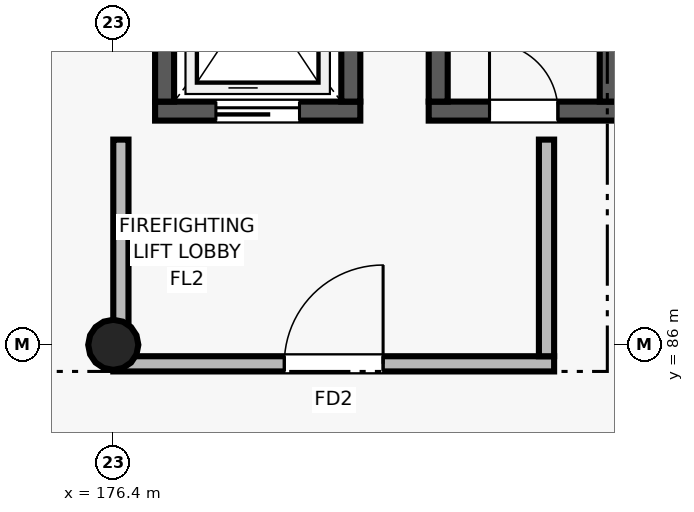
"""IFC4 building model, lengths in metres.
Left out: names, types, materials, properties, quantities, classifications, styles, units other than length and angle.
Written with IfcOpenShell. Run it as: python <this file> out.ifc"""

import sys

from ifc_helpers import new_model, si_unit, direction, frame, frame_2d, origin, origin_2d, place, context, subcontext, project, spatial, rectangle, circle, extrude, element, fill, save


model = new_model("IFC4")
c1 = context("Model", 3, precision=1e-05, world=origin(), true_north=direction((0.0, 1.0)))
c2 = subcontext(c1, "Body", "Model", "MODEL_VIEW")
j1 = project(units=[si_unit("LENGTHUNIT", "METRE"), si_unit("PLANEANGLEUNIT", "RADIAN")], contexts=[c1])
p1 = place(None, origin())
s1 = spatial("IfcSite", under=j1, at=p1, CompositionType="ELEMENT")
p2 = place(p1, origin())
s2 = spatial("IfcBuilding", under=s1, at=p2, CompositionType="ELEMENT")
p3 = place(p2, frame((0.0, 0.0, 4.5)))
s3 = spatial("IfcBuildingStorey", under=s2, at=p3, CompositionType="ELEMENT", Elevation=4.5)
p4 = place(p3, frame((176.4, 86.0, 0.0), z_axis=(0.0, 0.0, 1.0), x_axis=(1.0, 0.0, 0.0)))
e1 = element("IfcColumn", 1, at=p4, inside=s3, PredefinedType="COLUMN", context=c2, shape_type="SweptSolid", body=[
    extrude(circle(Radius=0.33, at=origin_2d()), origin(), (0.0, 0.0, 1.0), 4.5),
])
p5 = place(p3, frame((176.95, 89.075, 0.0), z_axis=(0.0, 0.0, 1.0), x_axis=(1.0, 0.0, 0.0)))
e2 = element("IfcWall", 2, at=p5, inside=s3, PredefinedType="SHEAR", context=c2, shape_type="SweptSolid", body=[
    extrude(rectangle(XDim=2.7, YDim=0.25, at=frame_2d((1.35, 0.0))), origin(), (0.0, 0.0, 1.0), 4.22),
])
p6 = place(p5, frame((0.8, 0.0, 0.0)))
e3 = element("IfcOpeningElement", 3, at=p6, cuts=e2, PredefinedType="OPENING", context=c2, shape_type="SweptSolid", body=[
    extrude(rectangle(XDim=1.1, YDim=2.15, at=frame_2d((0.55, 1.075))), frame((0.0, 0.135, 0.0), z_axis=(0.0, -1.0, 0.0), x_axis=(1.0, 0.0, 0.0)), (0.0, 0.0, 1.0), 0.27),
])
for number, where, z_axis, x_axis in (
    (4, (177.075, 89.2, 0.0), (0.0, 0.0, 1.0), (0.0, 1.0, 0.0)),
    (5, (179.525, 89.2, 0.0), (0.0, 0.0, 1.0), (0.0, 1.0, 0.0)),
):
    element("IfcWall", number, at=place(p3, frame(where, z_axis=z_axis, x_axis=x_axis)), inside=s3, PredefinedType="SHEAR", context=c2, shape_type="SweptSolid", body=[
        extrude(rectangle(XDim=2.9, YDim=0.25, at=frame_2d((1.45, 0.0))), origin(), (0.0, 0.0, 1.0), 4.22),
    ])
p7 = place(p3, frame((176.4, 85.75, 0.0), z_axis=(0.0, 0.0, 1.0), x_axis=(1.0, 0.0, 0.0)))
e6 = element("IfcWall", 6, at=p7, inside=s3, PredefinedType="SOLIDWALL", context=c2, shape_type="SweptSolid", body=[
    extrude(rectangle(XDim=5.8, YDim=0.2, at=frame_2d((2.9, 0.0))), origin(), (0.0, 0.0, 1.0), 3.5),
])
p8 = place(p7, frame((2.25, 0.0, 0.0)))
e7 = element("IfcOpeningElement", 7, at=p8, cuts=e6, PredefinedType="OPENING", context=c2, shape_type="SweptSolid", body=[
    extrude(rectangle(XDim=1.3, YDim=2.2, at=frame_2d((0.65, 1.1))), frame((0.0, 0.11, 0.0), z_axis=(0.0, -1.0, 0.0), x_axis=(1.0, 0.0, 0.0)), (0.0, 0.0, 1.0), 0.22),
])
p9 = place(p3, frame((176.5, 85.85, 0.0), z_axis=(0.0, 0.0, 1.0), x_axis=(0.0, 1.0, 0.0)))
e8 = element("IfcWall", 8, at=p9, inside=s3, PredefinedType="SOLIDWALL", context=c2, shape_type="SweptSolid", body=[
    extrude(rectangle(XDim=2.85, YDim=0.2, at=frame_2d((1.425, 0.0))), origin(), (0.0, 0.0, 1.0), 3.64),
])
p10 = place(p3, frame((182.1, 85.85, 0.0), z_axis=(0.0, 0.0, 1.0), x_axis=(0.0, 1.0, 0.0)))
e9 = element("IfcWall", 9, at=p10, inside=s3, PredefinedType="SOLIDWALL", context=c2, shape_type="SweptSolid", body=[
    extrude(rectangle(XDim=2.85, YDim=0.2, at=frame_2d((1.425, 0.0))), origin(), (0.0, 0.0, 1.0), 4.22),
])
p11 = place(p3, frame((180.55, 89.075, 0.0), z_axis=(0.0, 0.0, 1.0), x_axis=(1.0, 0.0, 0.0)))
e10 = element("IfcWall", 10, at=p11, inside=s3, PredefinedType="SHEAR", context=c2, shape_type="SweptSolid", body=[
    extrude(rectangle(XDim=2.5, YDim=0.25, at=frame_2d((1.25, 0.0))), origin(), (0.0, 0.0, 1.0), 4.22),
])
p12 = place(p11, frame((0.8, 0.0, 0.0)))
e11 = element("IfcOpeningElement", 11, at=p12, cuts=e10, PredefinedType="OPENING", context=c2, shape_type="SweptSolid", body=[
    extrude(rectangle(XDim=0.9, YDim=2.05, at=frame_2d((0.45, 1.025))), frame((0.0, 0.135, 0.0), z_axis=(0.0, -1.0, 0.0), x_axis=(1.0, 0.0, 0.0)), (0.0, 0.0, 1.0), 0.27),
])
for number, where, z_axis, x_axis in (
    (12, (180.675, 89.2, 0.0), (0.0, 0.0, 1.0), (0.0, 1.0, 0.0)),
    (13, (182.925, 89.2, 0.0), (0.0, 0.0, 1.0), (0.0, 1.0, 0.0)),
):
    element("IfcWall", number, at=place(p3, frame(where, z_axis=z_axis, x_axis=x_axis)), inside=s3, PredefinedType="SHEAR", context=c2, shape_type="SweptSolid", body=[
        extrude(rectangle(XDim=2.9, YDim=0.25, at=frame_2d((1.45, 0.0))), origin(), (0.0, 0.0, 1.0), 4.22),
    ])
p13 = place(p8, origin())
e14 = element("IfcDoor", 14, at=p13, inside=s3, OperationType="SINGLE_SWING_RIGHT", PredefinedType="DOOR", context=c2, shape_type="SweptSolid", body=[
    extrude(rectangle(XDim=1.3, YDim=2.2, at=frame_2d((0.65, 1.1))), frame((0.0, 0.025, 0.0), z_axis=(0.0, -1.0, 0.0), x_axis=(1.0, 0.0, 0.0)), (0.0, 0.0, 1.0), 0.05),
])
fill(e7, e14)
p14 = place(p12, origin())
e15 = element("IfcDoor", 15, at=p14, inside=s3, OperationType="SINGLE_SWING_LEFT", PredefinedType="DOOR", context=c2, shape_type="SweptSolid", body=[
    extrude(rectangle(XDim=0.9, YDim=2.05, at=frame_2d((0.45, 1.025))), frame((0.0, 0.025, 0.0), z_axis=(0.0, -1.0, 0.0), x_axis=(1.0, 0.0, 0.0)), (0.0, 0.0, 1.0), 0.05),
])
fill(e11, e15)
p15 = place(p6, origin())
e16 = element("IfcDoor", 16, at=p15, inside=s3, OperationType="SLIDING_TO_LEFT", PredefinedType="DOOR", context=c2, shape_type="SweptSolid", body=[
    extrude(rectangle(XDim=1.1, YDim=2.15, at=frame_2d((0.55, 1.075))), frame((0.0, 0.025, 0.0), z_axis=(0.0, -1.0, 0.0), x_axis=(1.0, 0.0, 0.0)), (0.0, 0.0, 1.0), 0.05),
])
fill(e3, e16)
save(model, sys.argv[1])
